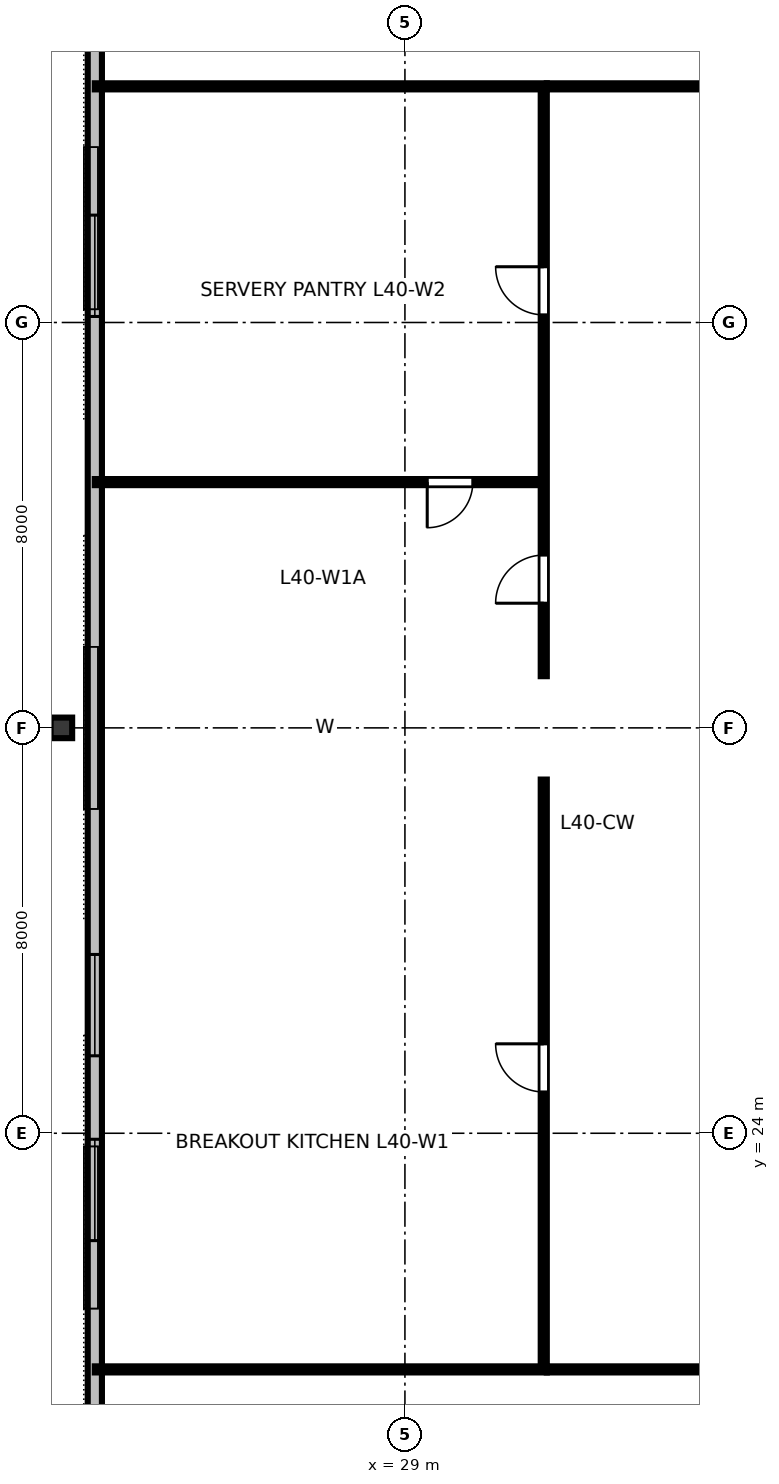
"""IFC4 building model, lengths in metres.
Left out: names, types, materials, properties, quantities, classifications, styles, units other than length and angle.
Written with IfcOpenShell. Run it as: python <this file> out.ifc"""

import sys

from ifc_helpers import new_model, si_unit, direction, frame, frame_2d, origin, origin_2d, place, context, subcontext, project, spatial, rectangle, i_section, extrude, element, fill, save


model = new_model("IFC4")
c1 = context("Model", 3, precision=1e-05, world=origin(), true_north=direction((0.0, 1.0)))
c2 = subcontext(c1, "Body", "Model", "MODEL_VIEW")
j1 = project(units=[si_unit("LENGTHUNIT", "METRE"), si_unit("PLANEANGLEUNIT", "RADIAN")], contexts=[c1])
p1 = place(None, origin())
s1 = spatial("IfcSite", under=j1, at=p1, CompositionType="ELEMENT")
p2 = place(p1, origin())
s2 = spatial("IfcBuilding", under=s1, at=p2, CompositionType="ELEMENT")
p3 = place(p2, frame((0.0, 0.0, 152.8)))
s3 = spatial("IfcBuildingStorey", under=s2, at=p3, CompositionType="ELEMENT", Elevation=152.8)
p4 = place(p3, frame((22.22, 32.0, 0.0), z_axis=(0.0, 0.0, 1.0), x_axis=(0.0, 1.0, 0.0)))
e1 = element("IfcColumn", 1, at=p4, inside=s3, PredefinedType="COLUMN", context=c2, shape_type="SweptSolid", body=[
    extrude(i_section(OverallWidth=0.406, OverallDepth=0.425, WebThickness=0.033, FlangeThickness=0.052, FilletRadius=0.025, at=origin_2d()), origin(), (0.0, 0.0, 1.0), 3.358),
])
p5 = place(p3, frame((22.88, 47.69, 0.0), z_axis=(0.0, 0.0, 1.0), x_axis=(0.0, -1.0, 0.0)))
e2 = element("IfcWall", 2, at=p5, inside=s3, PredefinedType="STANDARD", context=c2, shape_type="SweptSolid", body=[
    extrude(rectangle(XDim=31.38, YDim=0.28, at=frame_2d((15.69, 0.0))), origin(), (0.0, 0.0, 1.0), 3.36),
])
p6 = place(p5, frame((5.571, 0.0, 0.8)))
e3 = element("IfcOpeningElement", 3, at=p6, cuts=e2, PredefinedType="OPENING", context=c2, shape_type="SweptSolid", body=[
    extrude(rectangle(XDim=2.0, YDim=1.95, at=frame_2d((1.0, 0.975))), frame((0.0, 0.15, 0.0), z_axis=(0.0, -1.0, 0.0), x_axis=(1.0, 0.0, 0.0)), (0.0, 0.0, 1.0), 0.3),
])
p7 = place(p5, frame((20.161, 0.0, 0.8)))
e4 = element("IfcOpeningElement", 4, at=p7, cuts=e2, PredefinedType="OPENING", context=c2, shape_type="SweptSolid", body=[
    extrude(rectangle(XDim=2.0, YDim=1.95, at=frame_2d((1.0, 0.975))), frame((0.0, 0.15, 0.0), z_axis=(0.0, -1.0, 0.0), x_axis=(1.0, 0.0, 0.0)), (0.0, 0.0, 1.0), 0.3),
])
p8 = place(p5, frame((23.809, 0.0, 0.8)))
e5 = element("IfcOpeningElement", 5, at=p8, cuts=e2, PredefinedType="OPENING", context=c2, shape_type="SweptSolid", body=[
    extrude(rectangle(XDim=2.0, YDim=1.95, at=frame_2d((1.0, 0.975))), frame((0.0, 0.15, 0.0), z_axis=(0.0, -1.0, 0.0), x_axis=(1.0, 0.0, 0.0)), (0.0, 0.0, 1.0), 0.3),
])
p9 = place(p3, frame((31.8, 19.34, 0.0), z_axis=(0.0, 0.0, 1.0), x_axis=(1.0, 0.0, 0.0)))
e6 = element("IfcWall", 6, at=p9, inside=s3, PredefinedType="PARTITIONING", context=c2, shape_type="SweptSolid", body=[
    extrude(rectangle(XDim=28.4, YDim=0.12, at=frame_2d((14.2, 0.0))), origin(), (0.0, 0.0, 1.0), 2.64),
])
p10 = place(p9, frame((4.789, 0.0, 0.0)))
e7 = element("IfcOpeningElement", 7, at=p10, cuts=e6, PredefinedType="OPENING", context=c2, shape_type="SweptSolid", body=[
    extrude(rectangle(XDim=0.95, YDim=2.15, at=frame_2d((0.475, 1.075))), frame((0.0, 0.07, 0.0), z_axis=(0.0, -1.0, 0.0), x_axis=(1.0, 0.0, 0.0)), (0.0, 0.0, 1.0), 0.14),
])
p11 = place(p9, frame((12.708, 0.0, 0.0)))
e8 = element("IfcOpeningElement", 8, at=p11, cuts=e6, PredefinedType="OPENING", context=c2, shape_type="SweptSolid", body=[
    extrude(rectangle(XDim=0.95, YDim=2.15, at=frame_2d((0.475, 1.075))), frame((0.0, 0.07, 0.0), z_axis=(0.0, -1.0, 0.0), x_axis=(1.0, 0.0, 0.0)), (0.0, 0.0, 1.0), 0.14),
])
p12 = place(p9, frame((21.645, 0.0, 0.0)))
e9 = element("IfcOpeningElement", 9, at=p12, cuts=e6, PredefinedType="OPENING", context=c2, shape_type="SweptSolid", body=[
    extrude(rectangle(XDim=0.95, YDim=2.15, at=frame_2d((0.475, 1.075))), frame((0.0, 0.07, 0.0), z_axis=(0.0, -1.0, 0.0), x_axis=(1.0, 0.0, 0.0)), (0.0, 0.0, 1.0), 0.14),
])
p13 = place(p3, frame((31.8, 44.66, 0.0), z_axis=(0.0, 0.0, 1.0), x_axis=(1.0, 0.0, 0.0)))
e10 = element("IfcWall", 10, at=p13, inside=s3, PredefinedType="PARTITIONING", context=c2, shape_type="SweptSolid", body=[
    extrude(rectangle(XDim=28.4, YDim=0.12, at=frame_2d((14.2, 0.0))), origin(), (0.0, 0.0, 1.0), 2.64),
])
p14 = place(p13, frame((4.036, 0.0, 0.0)))
e11 = element("IfcOpeningElement", 11, at=p14, cuts=e10, PredefinedType="OPENING", context=c2, shape_type="SweptSolid", body=[
    extrude(rectangle(XDim=0.95, YDim=2.15, at=frame_2d((0.475, 1.075))), frame((0.0, 0.07, 0.0), z_axis=(0.0, -1.0, 0.0), x_axis=(1.0, 0.0, 0.0)), (0.0, 0.0, 1.0), 0.14),
])
p15 = place(p13, frame((12.256, 0.0, 0.0)))
e12 = element("IfcOpeningElement", 12, at=p15, cuts=e10, PredefinedType="OPENING", context=c2, shape_type="SweptSolid", body=[
    extrude(rectangle(XDim=0.95, YDim=2.15, at=frame_2d((0.475, 1.075))), frame((0.0, 0.07, 0.0), z_axis=(0.0, -1.0, 0.0), x_axis=(1.0, 0.0, 0.0)), (0.0, 0.0, 1.0), 0.14),
])
p16 = place(p13, frame((18.246, 0.0, 0.0)))
e13 = element("IfcOpeningElement", 13, at=p16, cuts=e10, PredefinedType="OPENING", context=c2, shape_type="SweptSolid", body=[
    extrude(rectangle(XDim=0.95, YDim=2.15, at=frame_2d((0.475, 1.075))), frame((0.0, 0.07, 0.0), z_axis=(0.0, -1.0, 0.0), x_axis=(1.0, 0.0, 0.0)), (0.0, 0.0, 1.0), 0.14),
])
p17 = place(p13, frame((24.086, 0.0, 0.0)))
e14 = element("IfcOpeningElement", 14, at=p17, cuts=e10, PredefinedType="OPENING", context=c2, shape_type="SweptSolid", body=[
    extrude(rectangle(XDim=0.95, YDim=2.15, at=frame_2d((0.475, 1.075))), frame((0.0, 0.07, 0.0), z_axis=(0.0, -1.0, 0.0), x_axis=(1.0, 0.0, 0.0)), (0.0, 0.0, 1.0), 0.14),
])
p18 = place(p3, frame((31.74, 36.85, 0.0), z_axis=(0.0, 0.0, 1.0), x_axis=(-1.0, 0.0, 0.0)))
e15 = element("IfcWall", 15, at=p18, inside=s3, PredefinedType="PARTITIONING", context=c2, shape_type="SweptSolid", body=[
    extrude(rectangle(XDim=8.86, YDim=0.12, at=frame_2d((4.43, 0.0))), origin(), (0.0, 0.0, 1.0), 2.64),
])
p19 = place(p18, frame((1.4, 0.0, 0.0)))
e16 = element("IfcOpeningElement", 16, at=p19, cuts=e15, PredefinedType="OPENING", context=c2, shape_type="SweptSolid", body=[
    extrude(rectangle(XDim=0.9, YDim=2.15, at=frame_2d((0.45, 1.075))), frame((0.0, 0.07, 0.0), z_axis=(0.0, -1.0, 0.0), x_axis=(1.0, 0.0, 0.0)), (0.0, 0.0, 1.0), 0.14),
])
p20 = place(p3, frame((31.74, 19.4, 0.0), z_axis=(0.0, 0.0, 1.0), x_axis=(0.0, 1.0, 0.0)))
e17 = element("IfcWall", 17, at=p20, inside=s3, PredefinedType="PARTITIONING", context=c2, shape_type="SweptSolid", body=[
    extrude(rectangle(XDim=11.58, YDim=0.12, at=frame_2d((5.79, 0.0))), origin(), (0.0, 0.0, 1.0), 2.64),
])
p21 = place(p20, frame((5.415, 0.0, 0.0)))
e18 = element("IfcOpeningElement", 18, at=p21, cuts=e17, PredefinedType="OPENING", context=c2, shape_type="SweptSolid", body=[
    extrude(rectangle(XDim=0.95, YDim=2.15, at=frame_2d((0.475, 1.075))), frame((0.0, 0.07, 0.0), z_axis=(0.0, -1.0, 0.0), x_axis=(1.0, 0.0, 0.0)), (0.0, 0.0, 1.0), 0.14),
])
p22 = place(p3, frame((31.74, 33.02, 0.0), z_axis=(0.0, 0.0, 1.0), x_axis=(0.0, 1.0, 0.0)))
e19 = element("IfcWall", 19, at=p22, inside=s3, PredefinedType="PARTITIONING", context=c2, shape_type="SweptSolid", body=[
    extrude(rectangle(XDim=11.58, YDim=0.12, at=frame_2d((5.79, 0.0))), origin(), (0.0, 0.0, 1.0), 2.64),
])
p23 = place(p22, frame((1.44, 0.0, 0.0)))
e20 = element("IfcOpeningElement", 20, at=p23, cuts=e19, PredefinedType="OPENING", context=c2, shape_type="SweptSolid", body=[
    extrude(rectangle(XDim=0.95, YDim=2.15, at=frame_2d((0.475, 1.075))), frame((0.0, 0.07, 0.0), z_axis=(0.0, -1.0, 0.0), x_axis=(1.0, 0.0, 0.0)), (0.0, 0.0, 1.0), 0.14),
])
p24 = place(p22, frame((7.13, 0.0, 0.0)))
e21 = element("IfcOpeningElement", 21, at=p24, cuts=e19, PredefinedType="OPENING", context=c2, shape_type="SweptSolid", body=[
    extrude(rectangle(XDim=0.95, YDim=2.15, at=frame_2d((0.475, 1.075))), frame((0.0, 0.07, 0.0), z_axis=(0.0, -1.0, 0.0), x_axis=(1.0, 0.0, 0.0)), (0.0, 0.0, 1.0), 0.14),
])
for number, where, z_axis, x_axis in (
    (22, (31.8, 19.34, 0.0), (0.0, 0.0, 1.0), (-1.0, 0.0, 0.0)),
    (23, (31.8, 44.66, 0.0), (0.0, 0.0, 1.0), (-1.0, 0.0, 0.0)),
):
    element("IfcWall", number, at=place(p3, frame(where, z_axis=z_axis, x_axis=x_axis)), inside=s3, PredefinedType="PARTITIONING", context=c2, shape_type="SweptSolid", body=[
        extrude(rectangle(XDim=8.92, YDim=0.12, at=frame_2d((4.46, 0.0))), origin(), (0.0, 0.0, 1.0), 2.64),
    ])
p25 = place(p6, origin())
e24 = element("IfcWindow", 24, at=p25, inside=s3, PartitioningType="SINGLE_PANEL", PredefinedType="WINDOW", context=c2, shape_type="SweptSolid", body=[
    extrude(rectangle(XDim=2.0, YDim=1.95, at=frame_2d((1.0, 0.975))), frame((0.0, 0.03, 0.0), z_axis=(0.0, -1.0, 0.0), x_axis=(1.0, 0.0, 0.0)), (0.0, 0.0, 1.0), 0.06),
])
fill(e3, e24)
p26 = place(p7, origin())
e25 = element("IfcWindow", 25, at=p26, inside=s3, PartitioningType="SINGLE_PANEL", PredefinedType="WINDOW", context=c2, shape_type="SweptSolid", body=[
    extrude(rectangle(XDim=2.0, YDim=1.95, at=frame_2d((1.0, 0.975))), frame((0.0, 0.03, 0.0), z_axis=(0.0, -1.0, 0.0), x_axis=(1.0, 0.0, 0.0)), (0.0, 0.0, 1.0), 0.06),
])
fill(e4, e25)
p27 = place(p8, origin())
e26 = element("IfcWindow", 26, at=p27, inside=s3, PartitioningType="SINGLE_PANEL", PredefinedType="WINDOW", context=c2, shape_type="SweptSolid", body=[
    extrude(rectangle(XDim=2.0, YDim=1.95, at=frame_2d((1.0, 0.975))), frame((0.0, 0.03, 0.0), z_axis=(0.0, -1.0, 0.0), x_axis=(1.0, 0.0, 0.0)), (0.0, 0.0, 1.0), 0.06),
])
fill(e5, e26)
p28 = place(p19, origin())
e27 = element("IfcDoor", 27, at=p28, inside=s3, OperationType="SINGLE_SWING_RIGHT", PredefinedType="DOOR", context=c2, shape_type="SweptSolid", body=[
    extrude(rectangle(XDim=0.9, YDim=2.15, at=frame_2d((0.45, 1.075))), frame((0.0, 0.025, 0.0), z_axis=(0.0, -1.0, 0.0), x_axis=(1.0, 0.0, 0.0)), (0.0, 0.0, 1.0), 0.05),
])
fill(e16, e27)
p29 = place(p21, origin())
e28 = element("IfcDoor", 28, at=p29, inside=s3, OperationType="SINGLE_SWING_RIGHT", PredefinedType="DOOR", context=c2, shape_type="SweptSolid", body=[
    extrude(rectangle(XDim=0.95, YDim=2.15, at=frame_2d((0.475, 1.075))), frame((0.0, 0.025, 0.0), z_axis=(0.0, -1.0, 0.0), x_axis=(1.0, 0.0, 0.0)), (0.0, 0.0, 1.0), 0.05),
])
fill(e18, e28)
p30 = place(p23, origin())
e29 = element("IfcDoor", 29, at=p30, inside=s3, OperationType="SINGLE_SWING_LEFT", PredefinedType="DOOR", context=c2, shape_type="SweptSolid", body=[
    extrude(rectangle(XDim=0.95, YDim=2.15, at=frame_2d((0.475, 1.075))), frame((0.0, 0.025, 0.0), z_axis=(0.0, -1.0, 0.0), x_axis=(1.0, 0.0, 0.0)), (0.0, 0.0, 1.0), 0.05),
])
fill(e20, e29)
p31 = place(p24, origin())
e30 = element("IfcDoor", 30, at=p31, inside=s3, OperationType="SINGLE_SWING_RIGHT", PredefinedType="DOOR", context=c2, shape_type="SweptSolid", body=[
    extrude(rectangle(XDim=0.95, YDim=2.15, at=frame_2d((0.475, 1.075))), frame((0.0, 0.025, 0.0), z_axis=(0.0, -1.0, 0.0), x_axis=(1.0, 0.0, 0.0)), (0.0, 0.0, 1.0), 0.05),
])
fill(e21, e30)
save(model, sys.argv[1])
